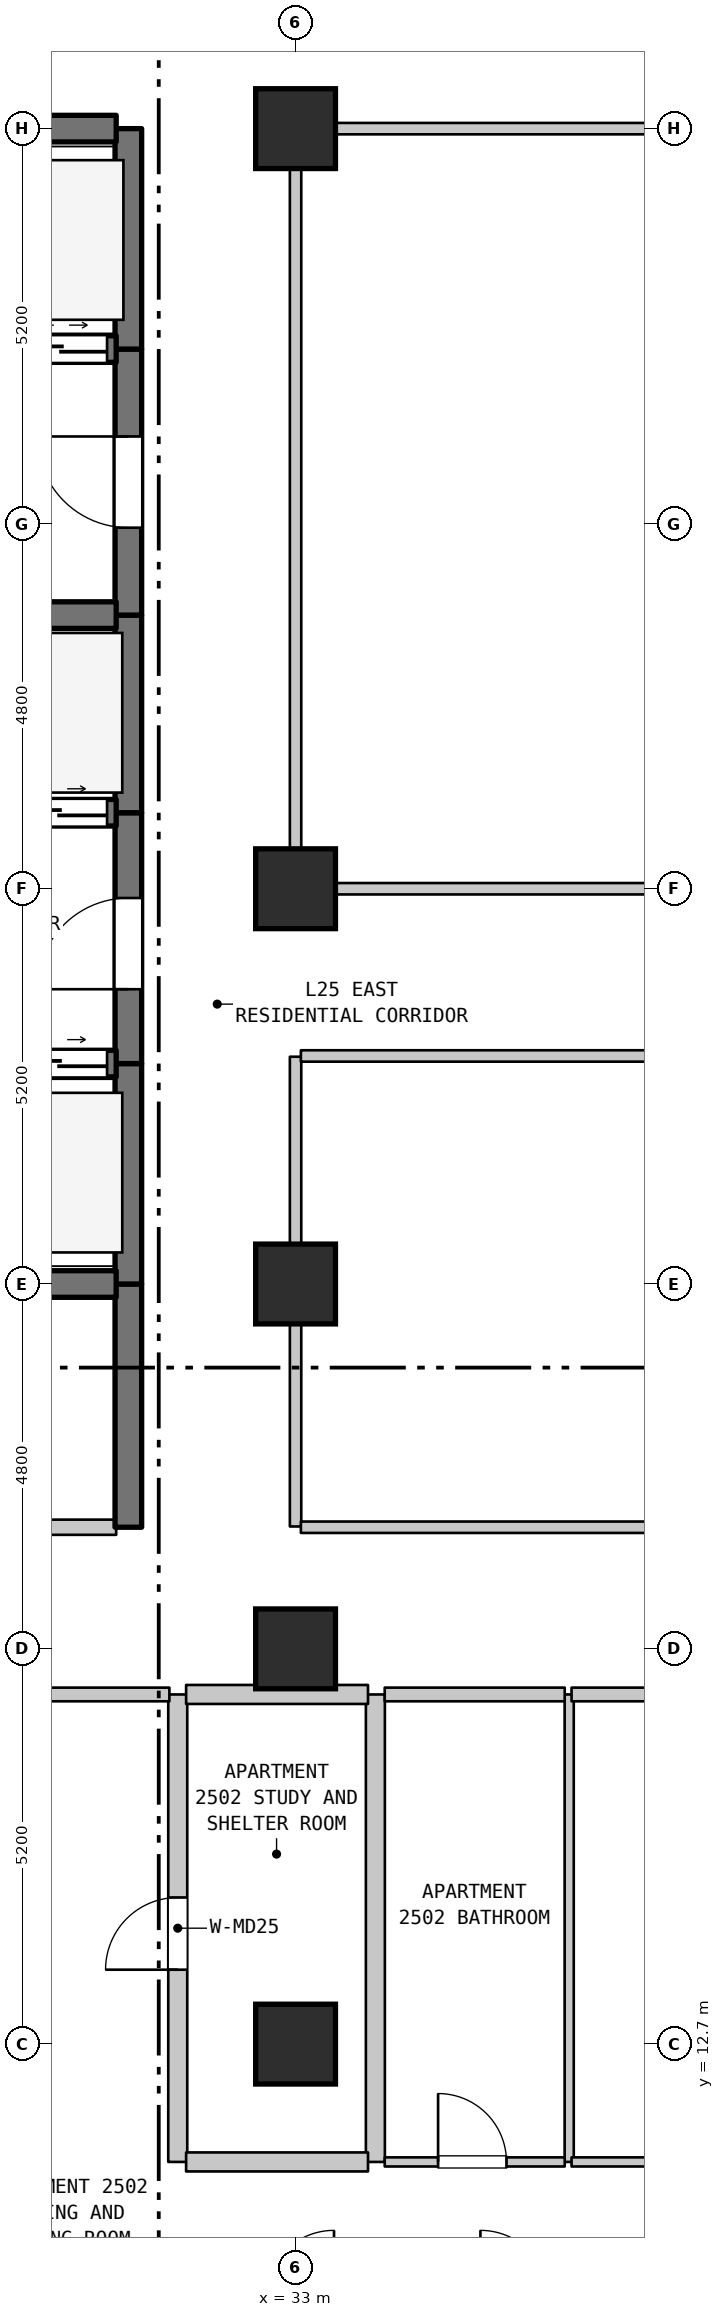
"""IFC4 building model, lengths in metres.
Left out: names, types, materials, properties, quantities, classifications, styles, units other than length and angle.
Written with IfcOpenShell. Run it as: python <this file> out.ifc"""

import sys

from ifc_helpers import new_model, si_unit, direction, frame, frame_2d, origin, origin_2d, place, context, subcontext, project, spatial, rectangle, extrude, element, fill, save


model = new_model("IFC4")
c1 = context("Model", 3, precision=1e-05, world=origin(), true_north=direction((0.0, 1.0)))
c2 = subcontext(c1, "Body", "Model", "MODEL_VIEW")
j1 = project(units=[si_unit("LENGTHUNIT", "METRE"), si_unit("PLANEANGLEUNIT", "RADIAN")], contexts=[c1])
p1 = place(None, origin())
s1 = spatial("IfcSite", under=j1, at=p1, CompositionType="ELEMENT")
p2 = place(p1, origin())
s2 = spatial("IfcBuilding", under=s1, at=p2, CompositionType="ELEMENT")
p3 = place(p2, frame((0.0, 0.0, 105.7)))
s3 = spatial("IfcBuildingStorey", under=s2, at=p3, CompositionType="ELEMENT", Elevation=105.7)
for number, where, z_axis, x_axis in (
    (1, (33.0, 12.7, 0.0), (0.0, 0.0, 1.0), (1.0, 0.0, 0.0)),
    (2, (33.0, 17.9, 0.0), (0.0, 0.0, 1.0), (1.0, 0.0, 0.0)),
    (3, (33.0, 22.7, 0.0), (0.0, 0.0, 1.0), (1.0, 0.0, 0.0)),
    (4, (33.0, 27.9, 0.0), (0.0, 0.0, 1.0), (1.0, 0.0, 0.0)),
    (5, (33.0, 37.9, 0.0), (0.0, 0.0, 1.0), (1.0, 0.0, 0.0)),
):
    element("IfcColumn", number, at=place(p3, frame(where, z_axis=z_axis, x_axis=x_axis)), inside=s3, PredefinedType="COLUMN", context=c2, shape_type="SweptSolid", body=[
        extrude(rectangle(XDim=1.05, YDim=1.05, at=origin_2d()), origin(), (0.0, 0.0, 1.0), 3.7),
    ])
p4 = place(p3, frame((30.8, 19.5, 0.0), z_axis=(0.0, 0.0, 1.0), x_axis=(0.0, 1.0, 0.0)))
e6 = element("IfcWall", 6, at=p4, inside=s3, PredefinedType="SHEAR", context=c2, shape_type="SweptSolid", body=[
    extrude(rectangle(XDim=3.2, YDim=0.35, at=frame_2d((1.6, 0.0))), origin(), (0.0, 0.0, 1.0), 3.385),
])
p5 = place(p3, frame((30.8, 22.7, 0.0), z_axis=(0.0, 0.0, 1.0), x_axis=(0.0, 1.0, 0.0)))
e7 = element("IfcWall", 7, at=p5, inside=s3, PredefinedType="SHEAR", context=c2, shape_type="SweptSolid", body=[
    extrude(rectangle(XDim=2.9, YDim=0.35, at=frame_2d((1.45, 0.0))), origin(), (0.0, 0.0, 1.0), 3.385),
])
p6 = place(p3, frame((30.8, 25.6, 0.0), z_axis=(0.0, 0.0, 1.0), x_axis=(0.0, 1.0, 0.0)))
e8 = element("IfcWall", 8, at=p6, inside=s3, PredefinedType="SHEAR", context=c2, shape_type="SweptSolid", body=[
    extrude(rectangle(XDim=3.3, YDim=0.35, at=frame_2d((1.65, 0.0))), origin(), (0.0, 0.0, 1.0), 3.385),
])
p7 = place(p6, frame((0.978, 0.0, 0.0)))
e9 = element("IfcOpeningElement", 9, at=p7, cuts=e8, PredefinedType="OPENING", context=c2, shape_type="SweptSolid", body=[
    extrude(rectangle(XDim=1.2, YDim=2.2, at=frame_2d((0.6, 1.1))), frame((0.0, 0.185, 0.0), z_axis=(0.0, -1.0, 0.0), x_axis=(1.0, 0.0, 0.0)), (0.0, 0.0, 1.0), 0.37),
])
p8 = place(p3, frame((30.8, 28.9, 0.0), z_axis=(0.0, 0.0, 1.0), x_axis=(0.0, 1.0, 0.0)))
e10 = element("IfcWall", 10, at=p8, inside=s3, PredefinedType="SHEAR", context=c2, shape_type="SweptSolid", body=[
    extrude(rectangle(XDim=2.6, YDim=0.35, at=frame_2d((1.3, 0.0))), origin(), (0.0, 0.0, 1.0), 3.385),
])
p9 = place(p3, frame((30.8, 31.5, 0.0), z_axis=(0.0, 0.0, 1.0), x_axis=(0.0, 1.0, 0.0)))
e11 = element("IfcWall", 11, at=p9, inside=s3, PredefinedType="SHEAR", context=c2, shape_type="SweptSolid", body=[
    extrude(rectangle(XDim=3.5, YDim=0.35, at=frame_2d((1.75, 0.0))), origin(), (0.0, 0.0, 1.0), 3.385),
])
p10 = place(p9, frame((1.15, 0.0, 0.0)))
e12 = element("IfcOpeningElement", 12, at=p10, cuts=e11, PredefinedType="OPENING", context=c2, shape_type="SweptSolid", body=[
    extrude(rectangle(XDim=1.2, YDim=2.2, at=frame_2d((0.6, 1.1))), frame((0.0, 0.185, 0.0), z_axis=(0.0, -1.0, 0.0), x_axis=(1.0, 0.0, 0.0)), (0.0, 0.0, 1.0), 0.37),
])
p11 = place(p3, frame((30.8, 35.0, 0.0), z_axis=(0.0, 0.0, 1.0), x_axis=(0.0, 1.0, 0.0)))
e13 = element("IfcWall", 13, at=p11, inside=s3, PredefinedType="SHEAR", context=c2, shape_type="SweptSolid", body=[
    extrude(rectangle(XDim=2.9, YDim=0.35, at=frame_2d((1.45, 0.0))), origin(), (0.0, 0.0, 1.0), 3.385),
])
p12 = place(p3, frame((31.45, 11.15, 0.0), z_axis=(0.0, 0.0, 1.0), x_axis=(0.0, 1.0, 0.0)))
e14 = element("IfcWall", 14, at=p12, inside=s3, PredefinedType="STANDARD", context=c2, shape_type="SweptSolid", body=[
    extrude(rectangle(XDim=6.15, YDim=0.25, at=frame_2d((3.075, 0.0))), origin(), (0.0, 0.0, 1.0), 3.385),
])
p13 = place(p12, frame((2.529, 0.0, 0.0)))
e15 = element("IfcOpeningElement", 15, at=p13, cuts=e14, PredefinedType="OPENING", context=c2, shape_type="SweptSolid", body=[
    extrude(rectangle(XDim=0.95, YDim=2.15, at=frame_2d((0.475, 1.075))), frame((0.0, 0.135, 0.0), z_axis=(0.0, -1.0, 0.0), x_axis=(1.0, 0.0, 0.0)), (0.0, 0.0, 1.0), 0.27),
])
p14 = place(p3, frame((33.0, 19.51, 0.0), z_axis=(0.0, 0.0, 1.0), x_axis=(0.0, 1.0, 0.0)))
e16 = element("IfcWall", 16, at=p14, inside=s3, PredefinedType="STANDARD", context=c2, shape_type="SweptSolid", body=[
    extrude(rectangle(XDim=6.18, YDim=0.15, at=frame_2d((3.09, 0.0))), origin(), (0.0, 0.0, 1.0), 2.935),
])
p15 = place(p3, frame((33.0, 27.91, 0.0), z_axis=(0.0, 0.0, 1.0), x_axis=(0.0, 1.0, 0.0)))
e17 = element("IfcWall", 17, at=p15, inside=s3, PredefinedType="STANDARD", context=c2, shape_type="SweptSolid", body=[
    extrude(rectangle(XDim=9.98, YDim=0.15, at=frame_2d((4.99, 0.0))), origin(), (0.0, 0.0, 1.0), 2.885),
])
p16 = place(p3, frame((34.05, 11.15, 0.0), z_axis=(0.0, 0.0, 1.0), x_axis=(0.0, 1.0, 0.0)))
e18 = element("IfcWall", 18, at=p16, inside=s3, PredefinedType="STANDARD", context=c2, shape_type="SweptSolid", body=[
    extrude(rectangle(XDim=6.15, YDim=0.25, at=frame_2d((3.075, 0.0))), origin(), (0.0, 0.0, 1.0), 3.385),
])
p17 = place(p3, frame((36.6, 11.15, 0.0), z_axis=(0.0, 0.0, 1.0), x_axis=(0.0, 1.0, 0.0)))
e19 = element("IfcWall", 19, at=p17, inside=s3, PredefinedType="PARTITIONING", context=c2, shape_type="SweptSolid", body=[
    extrude(rectangle(XDim=6.15, YDim=0.12, at=frame_2d((3.075, 0.0))), origin(), (0.0, 0.0, 1.0), 3.385),
])
p18 = place(p3, frame((31.56, 11.15, 0.0), z_axis=(0.0, 0.0, 1.0), x_axis=(1.0, 0.0, 0.0)))
e20 = element("IfcWall", 20, at=p18, inside=s3, PredefinedType="STANDARD", context=c2, shape_type="SweptSolid", body=[
    extrude(rectangle(XDim=2.393, YDim=0.25, at=frame_2d((1.196, 0.0))), origin(), (0.0, 0.0, 1.0), 3.385),
])
p19 = place(p3, frame((34.173, 11.15, 0.0), z_axis=(0.0, 0.0, 1.0), x_axis=(1.0, 0.0, 0.0)))
e21 = element("IfcWall", 21, at=p19, inside=s3, PredefinedType="PARTITIONING", context=c2, shape_type="SweptSolid", body=[
    extrude(rectangle(XDim=2.368, YDim=0.12, at=frame_2d((1.184, 0.0))), origin(), (0.0, 0.0, 1.0), 3.385),
])
p20 = place(p19, frame((0.702, 0.0, 0.0)))
e22 = element("IfcOpeningElement", 22, at=p20, cuts=e21, PredefinedType="OPENING", context=c2, shape_type="SweptSolid", body=[
    extrude(rectangle(XDim=0.9, YDim=2.1, at=frame_2d((0.45, 1.05))), frame((0.0, 0.07, 0.0), z_axis=(0.0, -1.0, 0.0), x_axis=(1.0, 0.0, 0.0)), (0.0, 0.0, 1.0), 0.14),
])
p21 = place(p3, frame((36.631, 11.15, 0.0), z_axis=(0.0, 0.0, 1.0), x_axis=(1.0, 0.0, 0.0)))
e23 = element("IfcWall", 23, at=p21, inside=s3, PredefinedType="PARTITIONING", context=c2, shape_type="SweptSolid", body=[
    extrude(rectangle(XDim=3.784, YDim=0.12, at=frame_2d((1.892, 0.0))), origin(), (0.0, 0.0, 1.0), 3.385),
])
p22 = place(p21, frame((1.37, 0.0, 0.0)))
e24 = element("IfcOpeningElement", 24, at=p22, cuts=e23, PredefinedType="OPENING", context=c2, shape_type="SweptSolid", body=[
    extrude(rectangle(XDim=0.9, YDim=2.15, at=frame_2d((0.45, 1.075))), frame((0.0, 0.07, 0.0), z_axis=(0.0, -1.0, 0.0), x_axis=(1.0, 0.0, 0.0)), (0.0, 0.0, 1.0), 0.14),
])
p23 = place(p3, frame((26.245, 17.3, 0.0), z_axis=(0.0, 0.0, 1.0), x_axis=(1.0, 0.0, 0.0)))
e25 = element("IfcWall", 25, at=p23, inside=s3, PredefinedType="STANDARD", context=c2, shape_type="SweptSolid", body=[
    extrude(rectangle(XDim=5.095, YDim=0.18, at=frame_2d((2.547, 0.0))), origin(), (0.0, 0.0, 1.0), 3.385),
])
p24 = place(p23, frame((2.08, 0.0, 0.0)))
e26 = element("IfcOpeningElement", 26, at=p24, cuts=e25, PredefinedType="OPENING", context=c2, shape_type="SweptSolid", body=[
    extrude(rectangle(XDim=1.0, YDim=2.15, at=frame_2d((0.5, 1.075))), frame((0.0, 0.1, 0.0), z_axis=(0.0, -1.0, 0.0), x_axis=(1.0, 0.0, 0.0)), (0.0, 0.0, 1.0), 0.2),
])
p25 = place(p3, frame((31.56, 17.3, 0.0), z_axis=(0.0, 0.0, 1.0), x_axis=(1.0, 0.0, 0.0)))
e27 = element("IfcWall", 27, at=p25, inside=s3, PredefinedType="STANDARD", context=c2, shape_type="SweptSolid", body=[
    extrude(rectangle(XDim=2.393, YDim=0.25, at=frame_2d((1.196, 0.0))), origin(), (0.0, 0.0, 1.0), 3.385),
])
p26 = place(p3, frame((34.173, 17.3, 0.0), z_axis=(0.0, 0.0, 1.0), x_axis=(1.0, 0.0, 0.0)))
e28 = element("IfcWall", 28, at=p26, inside=s3, PredefinedType="STANDARD", context=c2, shape_type="SweptSolid", body=[
    extrude(rectangle(XDim=2.368, YDim=0.18, at=frame_2d((1.184, 0.0))), origin(), (0.0, 0.0, 1.0), 3.385),
])
p27 = place(p3, frame((36.631, 17.3, 0.0), z_axis=(0.0, 0.0, 1.0), x_axis=(1.0, 0.0, 0.0)))
e29 = element("IfcWall", 29, at=p27, inside=s3, PredefinedType="STANDARD", context=c2, shape_type="SweptSolid", body=[
    extrude(rectangle(XDim=3.784, YDim=0.18, at=frame_2d((1.892, 0.0))), origin(), (0.0, 0.0, 1.0), 3.385),
])
p28 = place(p3, frame((25.985, 19.5, 0.0), z_axis=(0.0, 0.0, 1.0), x_axis=(1.0, 0.0, 0.0)))
e30 = element("IfcWall", 30, at=p28, inside=s3, PredefinedType="STANDARD", context=c2, shape_type="SweptSolid", body=[
    extrude(rectangle(XDim=4.655, YDim=0.2, at=frame_2d((2.327, 0.0))), origin(), (0.0, 0.0, 1.0), 3.385),
])
p29 = place(p28, frame((1.845, 0.0, 0.0)))
e31 = element("IfcOpeningElement", 31, at=p29, cuts=e30, PredefinedType="OPENING", context=c2, shape_type="SweptSolid", body=[
    extrude(rectangle(XDim=0.9, YDim=2.15, at=frame_2d((0.45, 1.075))), frame((0.0, 0.11, 0.0), z_axis=(0.0, -1.0, 0.0), x_axis=(1.0, 0.0, 0.0)), (0.0, 0.0, 1.0), 0.22),
])
p30 = place(p3, frame((33.07, 19.5, 0.0), z_axis=(0.0, 0.0, 1.0), x_axis=(1.0, 0.0, 0.0)))
e32 = element("IfcWall", 32, at=p30, inside=s3, PredefinedType="STANDARD", context=c2, shape_type="SweptSolid", body=[
    extrude(rectangle(XDim=21.51, YDim=0.15, at=frame_2d((10.755, 0.0))), origin(), (0.0, 0.0, 1.0), 3.385),
])
p31 = place(p3, frame((27.46, 22.7, 0.0), z_axis=(0.0, 0.0, 1.0), x_axis=(1.0, 0.0, 0.0)))
e33 = element("IfcWall", 33, at=p31, inside=s3, PredefinedType="SHEAR", context=c2, shape_type="SweptSolid", body=[
    extrude(rectangle(XDim=3.18, YDim=0.35, at=frame_2d((1.59, 0.0))), origin(), (0.0, 0.0, 1.0), 3.385),
])
p32 = place(p3, frame((27.46, 25.6, 0.0), z_axis=(0.0, 0.0, 1.0), x_axis=(1.0, 0.0, 0.0)))
e34 = element("IfcWall", 34, at=p32, inside=s3, PredefinedType="SHEAR", context=c2, shape_type="SweptSolid", body=[
    extrude(rectangle(XDim=3.18, YDim=0.35, at=frame_2d((1.59, 0.0))), origin(), (0.0, 0.0, 1.0), 3.385),
])
p33 = place(p32, frame((0.12, 0.0, 0.0)))
e35 = element("IfcOpeningElement", 35, at=p33, cuts=e34, PredefinedType="OPENING", context=c2, shape_type="SweptSolid", body=[
    extrude(rectangle(XDim=1.25, YDim=2.2, at=frame_2d((0.625, 1.1))), frame((0.0, 0.185, 0.0), z_axis=(0.0, -1.0, 0.0), x_axis=(1.0, 0.0, 0.0)), (0.0, 0.0, 1.0), 0.37),
])
p34 = place(p32, frame((1.81, 0.0, 0.0)))
e36 = element("IfcOpeningElement", 36, at=p34, cuts=e34, PredefinedType="OPENING", context=c2, shape_type="SweptSolid", body=[
    extrude(rectangle(XDim=1.25, YDim=2.2, at=frame_2d((0.625, 1.1))), frame((0.0, 0.185, 0.0), z_axis=(0.0, -1.0, 0.0), x_axis=(1.0, 0.0, 0.0)), (0.0, 0.0, 1.0), 0.37),
])
p35 = place(p3, frame((33.07, 25.7, 0.0), z_axis=(0.0, 0.0, 1.0), x_axis=(1.0, 0.0, 0.0)))
e37 = element("IfcWall", 37, at=p35, inside=s3, PredefinedType="STANDARD", context=c2, shape_type="SweptSolid", body=[
    extrude(rectangle(XDim=21.51, YDim=0.15, at=frame_2d((10.755, 0.0))), origin(), (0.0, 0.0, 1.0), 3.385),
])
p36 = place(p3, frame((33.07, 27.9, 0.0), z_axis=(0.0, 0.0, 1.0), x_axis=(1.0, 0.0, 0.0)))
e38 = element("IfcWall", 38, at=p36, inside=s3, PredefinedType="STANDARD", context=c2, shape_type="SweptSolid", body=[
    extrude(rectangle(XDim=11.93, YDim=0.15, at=frame_2d((5.965, 0.0))), origin(), (0.0, 0.0, 1.0), 2.885),
])
p37 = place(p36, frame((10.185, 0.0, 0.0)))
e39 = element("IfcOpeningElement", 39, at=p37, cuts=e38, PredefinedType="OPENING", context=c2, shape_type="SweptSolid", body=[
    extrude(rectangle(XDim=1.0, YDim=2.15, at=frame_2d((0.5, 1.075))), frame((0.0, 0.085, 0.0), z_axis=(0.0, -1.0, 0.0), x_axis=(1.0, 0.0, 0.0)), (0.0, 0.0, 1.0), 0.17),
])
p38 = place(p3, frame((27.46, 28.9, 0.0), z_axis=(0.0, 0.0, 1.0), x_axis=(1.0, 0.0, 0.0)))
e40 = element("IfcWall", 40, at=p38, inside=s3, PredefinedType="SHEAR", context=c2, shape_type="SweptSolid", body=[
    extrude(rectangle(XDim=3.18, YDim=0.35, at=frame_2d((1.59, 0.0))), origin(), (0.0, 0.0, 1.0), 3.385),
])
p39 = place(p38, frame((0.12, 0.0, 0.0)))
e41 = element("IfcOpeningElement", 41, at=p39, cuts=e40, PredefinedType="OPENING", context=c2, shape_type="SweptSolid", body=[
    extrude(rectangle(XDim=1.25, YDim=2.2, at=frame_2d((0.625, 1.1))), frame((0.0, 0.185, 0.0), z_axis=(0.0, -1.0, 0.0), x_axis=(1.0, 0.0, 0.0)), (0.0, 0.0, 1.0), 0.37),
])
p40 = place(p38, frame((1.81, 0.0, 0.0)))
e42 = element("IfcOpeningElement", 42, at=p40, cuts=e40, PredefinedType="OPENING", context=c2, shape_type="SweptSolid", body=[
    extrude(rectangle(XDim=1.25, YDim=2.2, at=frame_2d((0.625, 1.1))), frame((0.0, 0.185, 0.0), z_axis=(0.0, -1.0, 0.0), x_axis=(1.0, 0.0, 0.0)), (0.0, 0.0, 1.0), 0.37),
])
p41 = place(p3, frame((27.46, 31.5, 0.0), z_axis=(0.0, 0.0, 1.0), x_axis=(1.0, 0.0, 0.0)))
e43 = element("IfcWall", 43, at=p41, inside=s3, PredefinedType="SHEAR", context=c2, shape_type="SweptSolid", body=[
    extrude(rectangle(XDim=3.18, YDim=0.35, at=frame_2d((1.59, 0.0))), origin(), (0.0, 0.0, 1.0), 3.385),
])
p42 = place(p3, frame((19.16, 35.0, 0.0), z_axis=(0.0, 0.0, 1.0), x_axis=(1.0, 0.0, 0.0)))
e44 = element("IfcWall", 44, at=p42, inside=s3, PredefinedType="SHEAR", context=c2, shape_type="SweptSolid", body=[
    extrude(rectangle(XDim=11.48, YDim=0.35, at=frame_2d((5.74, 0.0))), origin(), (0.0, 0.0, 1.0), 3.385),
])
p43 = place(p42, frame((0.365, 0.0, 0.0)))
e45 = element("IfcOpeningElement", 45, at=p43, cuts=e44, PredefinedType="OPENING", context=c2, shape_type="SweptSolid", body=[
    extrude(rectangle(XDim=1.35, YDim=2.2, at=frame_2d((0.675, 1.1))), frame((0.0, 0.185, 0.0), z_axis=(0.0, -1.0, 0.0), x_axis=(1.0, 0.0, 0.0)), (0.0, 0.0, 1.0), 0.37),
])
p44 = place(p42, frame((2.765, 0.0, 0.0)))
e46 = element("IfcOpeningElement", 46, at=p44, cuts=e44, PredefinedType="OPENING", context=c2, shape_type="SweptSolid", body=[
    extrude(rectangle(XDim=1.35, YDim=2.2, at=frame_2d((0.675, 1.1))), frame((0.0, 0.185, 0.0), z_axis=(0.0, -1.0, 0.0), x_axis=(1.0, 0.0, 0.0)), (0.0, 0.0, 1.0), 0.37),
])
p45 = place(p42, frame((4.915, 0.0, 0.0)))
e47 = element("IfcOpeningElement", 47, at=p45, cuts=e44, PredefinedType="OPENING", context=c2, shape_type="SweptSolid", body=[
    extrude(rectangle(XDim=1.2, YDim=2.2, at=frame_2d((0.6, 1.1))), frame((0.0, 0.185, 0.0), z_axis=(0.0, -1.0, 0.0), x_axis=(1.0, 0.0, 0.0)), (0.0, 0.0, 1.0), 0.37),
])
p46 = place(p42, frame((6.665, 0.0, 0.0)))
e48 = element("IfcOpeningElement", 48, at=p46, cuts=e44, PredefinedType="OPENING", context=c2, shape_type="SweptSolid", body=[
    extrude(rectangle(XDim=1.2, YDim=2.2, at=frame_2d((0.6, 1.1))), frame((0.0, 0.185, 0.0), z_axis=(0.0, -1.0, 0.0), x_axis=(1.0, 0.0, 0.0)), (0.0, 0.0, 1.0), 0.37),
])
p47 = place(p42, frame((8.415, 0.0, 0.0)))
e49 = element("IfcOpeningElement", 49, at=p47, cuts=e44, PredefinedType="OPENING", context=c2, shape_type="SweptSolid", body=[
    extrude(rectangle(XDim=1.2, YDim=2.2, at=frame_2d((0.6, 1.1))), frame((0.0, 0.185, 0.0), z_axis=(0.0, -1.0, 0.0), x_axis=(1.0, 0.0, 0.0)), (0.0, 0.0, 1.0), 0.37),
])
p48 = place(p42, frame((10.16, 0.0, 0.0)))
e50 = element("IfcOpeningElement", 50, at=p48, cuts=e44, PredefinedType="OPENING", context=c2, shape_type="SweptSolid", body=[
    extrude(rectangle(XDim=1.2, YDim=2.2, at=frame_2d((0.6, 1.1))), frame((0.0, 0.185, 0.0), z_axis=(0.0, -1.0, 0.0), x_axis=(1.0, 0.0, 0.0)), (0.0, 0.0, 1.0), 0.37),
])
p49 = place(p3, frame((19.16, 37.9, 0.0), z_axis=(0.0, 0.0, 1.0), x_axis=(1.0, 0.0, 0.0)))
e51 = element("IfcWall", 51, at=p49, inside=s3, PredefinedType="SHEAR", context=c2, shape_type="SweptSolid", body=[
    extrude(rectangle(XDim=11.48, YDim=0.35, at=frame_2d((5.74, 0.0))), origin(), (0.0, 0.0, 1.0), 3.385),
])
p50 = place(p3, frame((33.07, 37.9, 0.0), z_axis=(0.0, 0.0, 1.0), x_axis=(1.0, 0.0, 0.0)))
e52 = element("IfcWall", 52, at=p50, inside=s3, PredefinedType="STANDARD", context=c2, shape_type="SweptSolid", body=[
    extrude(rectangle(XDim=26.935, YDim=0.15, at=frame_2d((13.467, 0.0))), origin(), (0.0, 0.0, 1.0), 3.385),
])
p51 = place(p50, frame((12.96, 0.0, 0.0)))
e53 = element("IfcOpeningElement", 53, at=p51, cuts=e52, PredefinedType="OPENING", context=c2, shape_type="SweptSolid", body=[
    extrude(rectangle(XDim=1.0, YDim=2.15, at=frame_2d((0.5, 1.075))), frame((0.0, 0.085, 0.0), z_axis=(0.0, -1.0, 0.0), x_axis=(1.0, 0.0, 0.0)), (0.0, 0.0, 1.0), 0.17),
])
p52 = place(p7, origin())
e54 = element("IfcDoor", 54, at=p52, inside=s3, OperationType="SINGLE_SWING_LEFT", PredefinedType="DOOR", context=c2, shape_type="SweptSolid", body=[
    extrude(rectangle(XDim=1.2, YDim=2.2, at=frame_2d((0.6, 1.1))), frame((0.0, 0.025, 0.0), z_axis=(0.0, -1.0, 0.0), x_axis=(1.0, 0.0, 0.0)), (0.0, 0.0, 1.0), 0.05),
])
fill(e9, e54)
p53 = place(p10, origin())
e55 = element("IfcDoor", 55, at=p53, inside=s3, OperationType="SINGLE_SWING_RIGHT", PredefinedType="DOOR", context=c2, shape_type="SweptSolid", body=[
    extrude(rectangle(XDim=1.2, YDim=2.2, at=frame_2d((0.6, 1.1))), frame((0.0, 0.025, 0.0), z_axis=(0.0, -1.0, 0.0), x_axis=(1.0, 0.0, 0.0)), (0.0, 0.0, 1.0), 0.05),
])
fill(e12, e55)
p54 = place(p13, origin())
e56 = element("IfcDoor", 56, at=p54, inside=s3, OperationType="SINGLE_SWING_LEFT", PredefinedType="DOOR", context=c2, shape_type="SweptSolid", body=[
    extrude(rectangle(XDim=0.95, YDim=2.15, at=frame_2d((0.475, 1.075))), frame((0.0, 0.025, 0.0), z_axis=(0.0, -1.0, 0.0), x_axis=(1.0, 0.0, 0.0)), (0.0, 0.0, 1.0), 0.05),
])
fill(e15, e56)
p55 = place(p20, origin())
e57 = element("IfcDoor", 57, at=p55, inside=s3, OperationType="SINGLE_SWING_LEFT", PredefinedType="DOOR", context=c2, shape_type="SweptSolid", body=[
    extrude(rectangle(XDim=0.9, YDim=2.1, at=frame_2d((0.45, 1.05))), frame((0.0, 0.025, 0.0), z_axis=(0.0, -1.0, 0.0), x_axis=(1.0, 0.0, 0.0)), (0.0, 0.0, 1.0), 0.05),
])
fill(e22, e57)
p56 = place(p34, origin())
e58 = element("IfcDoor", 58, at=p56, inside=s3, OperationType="DOUBLE_DOOR_SLIDING", PredefinedType="DOOR", context=c2, shape_type="SweptSolid", body=[
    extrude(rectangle(XDim=1.25, YDim=2.2, at=frame_2d((0.625, 1.1))), frame((0.0, 0.025, 0.0), z_axis=(0.0, -1.0, 0.0), x_axis=(1.0, 0.0, 0.0)), (0.0, 0.0, 1.0), 0.05),
])
fill(e36, e58)
p57 = place(p40, origin())
e59 = element("IfcDoor", 59, at=p57, inside=s3, OperationType="DOUBLE_DOOR_SLIDING", PredefinedType="DOOR", context=c2, shape_type="SweptSolid", body=[
    extrude(rectangle(XDim=1.25, YDim=2.2, at=frame_2d((0.625, 1.1))), frame((0.0, 0.025, 0.0), z_axis=(0.0, -1.0, 0.0), x_axis=(1.0, 0.0, 0.0)), (0.0, 0.0, 1.0), 0.05),
])
fill(e42, e59)
p58 = place(p48, origin())
e60 = element("IfcDoor", 60, at=p58, inside=s3, OperationType="DOUBLE_DOOR_SLIDING", PredefinedType="DOOR", context=c2, shape_type="SweptSolid", body=[
    extrude(rectangle(XDim=1.2, YDim=2.2, at=frame_2d((0.6, 1.1))), frame((0.0, 0.025, 0.0), z_axis=(0.0, -1.0, 0.0), x_axis=(1.0, 0.0, 0.0)), (0.0, 0.0, 1.0), 0.05),
])
fill(e50, e60)
save(model, sys.argv[1])
